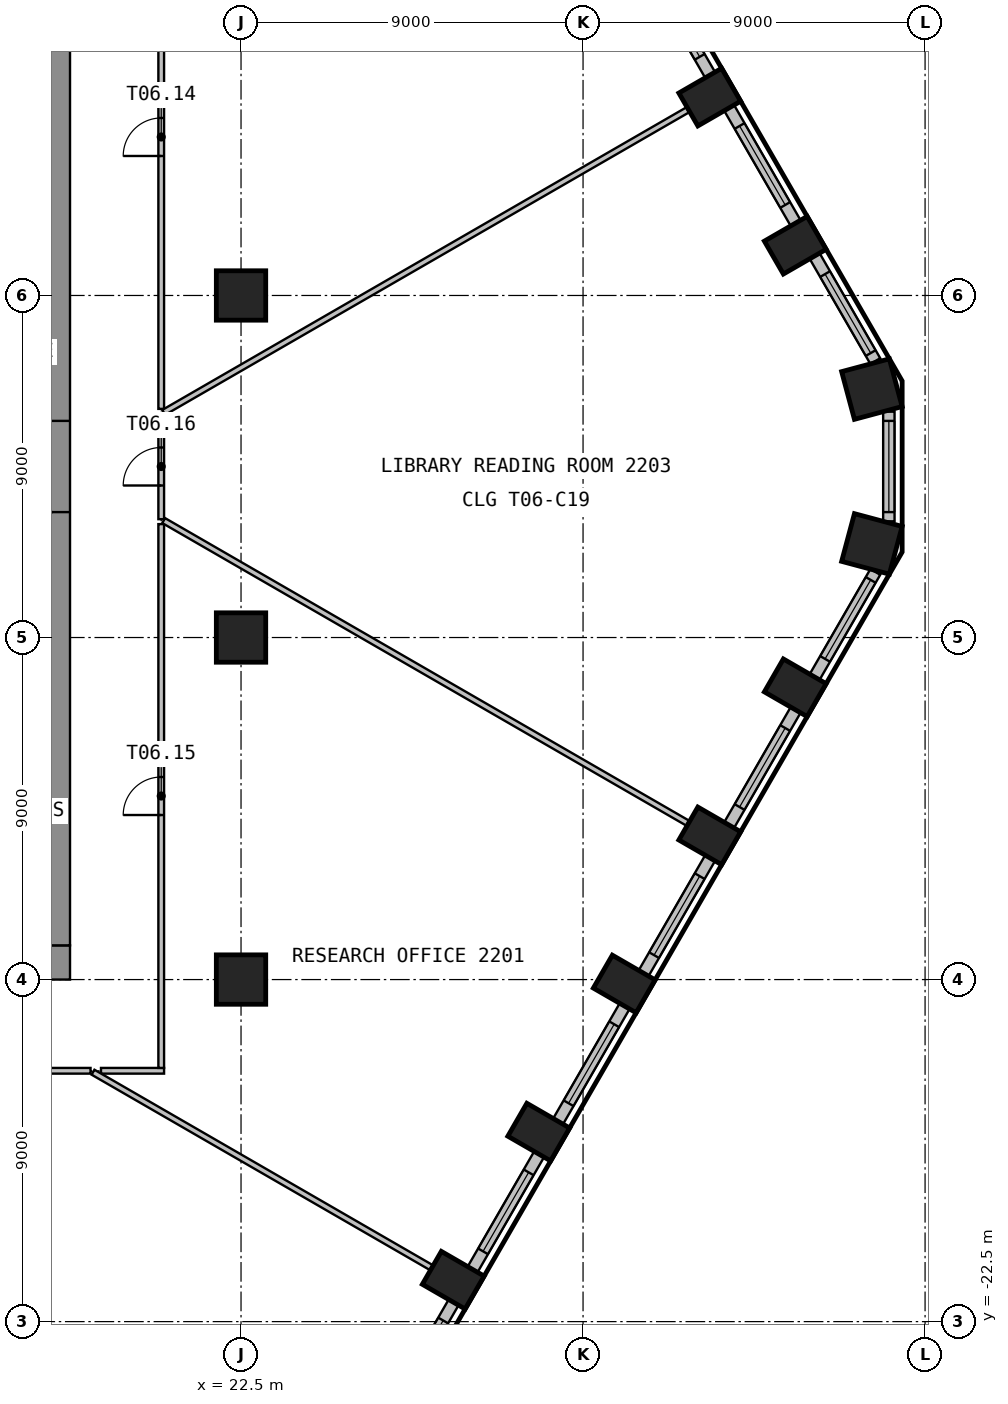
"""IFC4 building model, lengths in metres.
Left out: names, types, materials, properties, quantities, classifications, styles, units other than length and angle.
Written with IfcOpenShell. Run it as: python <this file> out.ifc"""

import sys

from ifc_helpers import new_model, si_unit, direction, frame, frame_2d, origin, origin_2d, place, context, subcontext, project, spatial, rectangle, circle, extrude, element, fill, save


model = new_model("IFC4")
c1 = context("Model", 3, precision=1e-05, world=origin(), true_north=direction((0.0, 1.0)))
c2 = subcontext(c1, "Body", "Model", "MODEL_VIEW")
j1 = project(units=[si_unit("LENGTHUNIT", "METRE"), si_unit("PLANEANGLEUNIT", "RADIAN")], contexts=[c1])
p1 = place(None, origin())
s1 = spatial("IfcSite", under=j1, at=p1, CompositionType="ELEMENT")
p2 = place(p1, origin())
s2 = spatial("IfcBuilding", under=s1, at=p2, CompositionType="ELEMENT")
p3 = place(p2, frame((0.0, 0.0, 93.0)))
s3 = spatial("IfcBuildingStorey", under=s2, at=p3, CompositionType="ELEMENT", Elevation=93.0)
for number, where, z_axis, x_axis in (
    (1, (28.084, -21.411, 0.0), (0.0, 0.0, 1.0), (0.5, 0.866, 0.0)),
    (2, (30.334, -17.513, 0.0), (0.0, 0.0, 1.0), (0.5, 0.866, 0.0)),
    (3, (32.584, -13.616, 0.0), (0.0, 0.0, 1.0), (0.5, 0.866, 0.0)),
    (4, (34.834, -9.719, 0.0), (0.0, 0.0, 1.0), (0.5, 0.866, 0.0)),
    (5, (37.084, -5.822, 0.0), (0.0, 0.0, 1.0), (0.5, 0.866, 0.0)),
):
    element("IfcColumn", number, at=place(p3, frame(where, z_axis=z_axis, x_axis=x_axis)), inside=s3, PredefinedType="COLUMN", context=c2, shape_type="SweptSolid", body=[
        extrude(rectangle(XDim=1.0, YDim=1.3, at=origin_2d()), origin(), (0.0, 0.0, 1.0), 3.525),
    ])
for number, where, z_axis, x_axis in (
    (6, (39.101, -2.037, 0.0), (0.0, 0.0, 1.0), (0.259, 0.966, 0.0)),
    (7, (39.101, 2.037, 0.0), (0.0, 0.0, 1.0), (-0.259, 0.966, 0.0)),
):
    element("IfcColumn", number, at=place(p3, frame(where, z_axis=z_axis, x_axis=x_axis)), inside=s3, PredefinedType="COLUMN", context=c2, shape_type="SweptSolid", body=[
        extrude(rectangle(XDim=1.3, YDim=1.3, at=origin_2d()), origin(), (0.0, 0.0, 1.0), 3.525),
    ])
for number, where, z_axis, x_axis in (
    (8, (37.084, 5.822, 0.0), (0.0, 0.0, 1.0), (-0.5, 0.866, 0.0)),
    (9, (34.834, 9.719, 0.0), (0.0, 0.0, 1.0), (-0.5, 0.866, 0.0)),
):
    element("IfcColumn", number, at=place(p3, frame(where, z_axis=z_axis, x_axis=x_axis)), inside=s3, PredefinedType="COLUMN", context=c2, shape_type="SweptSolid", body=[
        extrude(rectangle(XDim=1.0, YDim=1.3, at=origin_2d()), origin(), (0.0, 0.0, 1.0), 3.525),
    ])
for number, where, z_axis, x_axis in (
    (10, (22.5, -13.5, 0.0), (0.0, 0.0, 1.0), (1.0, 0.0, 0.0)),
    (11, (22.5, -4.5, 0.0), (0.0, 0.0, 1.0), (1.0, 0.0, 0.0)),
    (12, (22.5, 4.5, 0.0), (0.0, 0.0, 1.0), (1.0, 0.0, 0.0)),
):
    element("IfcColumn", number, at=place(p3, frame(where, z_axis=z_axis, x_axis=x_axis)), inside=s3, PredefinedType="COLUMN", context=c2, shape_type="SweptSolid", body=[
        extrude(circle(Radius=0.65, at=origin_2d()), origin(), (0.0, 0.0, 1.0), 3.525),
    ])
p4 = place(p3, frame((26.344, -25.024, 0.0), z_axis=(0.0, 0.0, 1.0), x_axis=(0.499996256241, 0.866027565234, 0.0)))
e13 = element("IfcWall", 13, at=p4, inside=s3, PredefinedType="SOLIDWALL", context=c2, shape_type="SweptSolid", body=[
    extrude(rectangle(XDim=3.499, YDim=0.3, at=frame_2d((1.75, 0.0))), origin(), (0.0, 0.0, 1.0), 3.525),
])
p5 = place(p4, frame((0.55, 0.0, 0.9)))
e14 = element("IfcOpeningElement", 14, at=p5, cuts=e13, PredefinedType="OPENING", context=c2, shape_type="SweptSolid", body=[
    extrude(rectangle(XDim=2.4, YDim=2.1, at=frame_2d((1.2, 1.05))), frame((0.0, 0.16, 0.0), z_axis=(0.0, -1.0, 0.0), x_axis=(1.0, 0.0, 0.0)), (0.0, 0.0, 1.0), 0.32),
])
p6 = place(p3, frame((28.594, -21.127, 0.0), z_axis=(0.0, 0.0, 1.0), x_axis=(0.499996256241, 0.866027565234, 0.0)))
e15 = element("IfcWall", 15, at=p6, inside=s3, PredefinedType="SOLIDWALL", context=c2, shape_type="SweptSolid", body=[
    extrude(rectangle(XDim=3.499, YDim=0.3, at=frame_2d((1.75, 0.0))), origin(), (0.0, 0.0, 1.0), 3.525),
])
p7 = place(p6, frame((0.55, 0.0, 0.9)))
e16 = element("IfcOpeningElement", 16, at=p7, cuts=e15, PredefinedType="OPENING", context=c2, shape_type="SweptSolid", body=[
    extrude(rectangle(XDim=2.4, YDim=2.1, at=frame_2d((1.2, 1.05))), frame((0.0, 0.16, 0.0), z_axis=(0.0, -1.0, 0.0), x_axis=(1.0, 0.0, 0.0)), (0.0, 0.0, 1.0), 0.32),
])
p8 = place(p3, frame((30.844, -17.23, 0.0), z_axis=(0.0, 0.0, 1.0), x_axis=(0.499996256241, 0.866027565234, 0.0)))
e17 = element("IfcWall", 17, at=p8, inside=s3, PredefinedType="SOLIDWALL", context=c2, shape_type="SweptSolid", body=[
    extrude(rectangle(XDim=3.499, YDim=0.3, at=frame_2d((1.75, 0.0))), origin(), (0.0, 0.0, 1.0), 3.525),
])
p9 = place(p8, frame((0.55, 0.0, 0.9)))
e18 = element("IfcOpeningElement", 18, at=p9, cuts=e17, PredefinedType="OPENING", context=c2, shape_type="SweptSolid", body=[
    extrude(rectangle(XDim=2.4, YDim=2.1, at=frame_2d((1.2, 1.05))), frame((0.0, 0.16, 0.0), z_axis=(0.0, -1.0, 0.0), x_axis=(1.0, 0.0, 0.0)), (0.0, 0.0, 1.0), 0.32),
])
p10 = place(p3, frame((33.094, -13.333, 0.0), z_axis=(0.0, 0.0, 1.0), x_axis=(0.499996256241, 0.866027565234, 0.0)))
e19 = element("IfcWall", 19, at=p10, inside=s3, PredefinedType="SOLIDWALL", context=c2, shape_type="SweptSolid", body=[
    extrude(rectangle(XDim=3.499, YDim=0.3, at=frame_2d((1.75, 0.0))), origin(), (0.0, 0.0, 1.0), 3.525),
])
p11 = place(p10, frame((0.55, 0.0, 0.9)))
e20 = element("IfcOpeningElement", 20, at=p11, cuts=e19, PredefinedType="OPENING", context=c2, shape_type="SweptSolid", body=[
    extrude(rectangle(XDim=2.4, YDim=2.1, at=frame_2d((1.2, 1.05))), frame((0.0, 0.16, 0.0), z_axis=(0.0, -1.0, 0.0), x_axis=(1.0, 0.0, 0.0)), (0.0, 0.0, 1.0), 0.32),
])
p12 = place(p3, frame((35.344, -9.436, 0.0), z_axis=(0.0, 0.0, 1.0), x_axis=(0.499996256241, 0.866027565234, 0.0)))
e21 = element("IfcWall", 21, at=p12, inside=s3, PredefinedType="SOLIDWALL", context=c2, shape_type="SweptSolid", body=[
    extrude(rectangle(XDim=3.499, YDim=0.3, at=frame_2d((1.75, 0.0))), origin(), (0.0, 0.0, 1.0), 3.525),
])
p13 = place(p12, frame((0.55, 0.0, 0.9)))
e22 = element("IfcOpeningElement", 22, at=p13, cuts=e21, PredefinedType="OPENING", context=c2, shape_type="SweptSolid", body=[
    extrude(rectangle(XDim=2.4, YDim=2.1, at=frame_2d((1.2, 1.05))), frame((0.0, 0.16, 0.0), z_axis=(0.0, -1.0, 0.0), x_axis=(1.0, 0.0, 0.0)), (0.0, 0.0, 1.0), 0.32),
])
p14 = place(p3, frame((37.594, -5.539, 0.0), z_axis=(0.0, 0.0, 1.0), x_axis=(0.500004907028, 0.866022570692, 0.0)))
e23 = element("IfcWall", 23, at=p14, inside=s3, PredefinedType="SOLIDWALL", context=c2, shape_type="SweptSolid", body=[
    extrude(rectangle(XDim=3.192, YDim=0.3, at=frame_2d((1.596, 0.0))), origin(), (0.0, 0.0, 1.0), 3.525),
])
p15 = place(p14, frame((0.55, 0.0, 0.9)))
e24 = element("IfcOpeningElement", 24, at=p15, cuts=e23, PredefinedType="OPENING", context=c2, shape_type="SweptSolid", body=[
    extrude(rectangle(XDim=2.4, YDim=2.1, at=frame_2d((1.2, 1.05))), frame((0.0, 0.16, 0.0), z_axis=(0.0, -1.0, 0.0), x_axis=(1.0, 0.0, 0.0)), (0.0, 0.0, 1.0), 0.32),
])
p16 = place(p3, frame((39.547, -1.443, 0.0), z_axis=(0.0, 0.0, 1.0), x_axis=(0.0, 1.0, 0.0)))
e25 = element("IfcWall", 25, at=p16, inside=s3, PredefinedType="SOLIDWALL", context=c2, shape_type="SweptSolid", body=[
    extrude(rectangle(XDim=2.886, YDim=0.3, at=frame_2d((1.443, 0.0))), origin(), (0.0, 0.0, 1.0), 3.525),
])
p17 = place(p16, frame((0.243, 0.0, 0.9)))
e26 = element("IfcOpeningElement", 26, at=p17, cuts=e25, PredefinedType="OPENING", context=c2, shape_type="SweptSolid", body=[
    extrude(rectangle(XDim=2.4, YDim=2.1, at=frame_2d((1.2, 1.05))), frame((0.0, 0.16, 0.0), z_axis=(0.0, -1.0, 0.0), x_axis=(1.0, 0.0, 0.0)), (0.0, 0.0, 1.0), 0.32),
])
p18 = place(p3, frame((39.19, 2.774, 0.0), z_axis=(0.0, 0.0, 1.0), x_axis=(-0.500004907028, 0.866022570692, 0.0)))
e27 = element("IfcWall", 27, at=p18, inside=s3, PredefinedType="SOLIDWALL", context=c2, shape_type="SweptSolid", body=[
    extrude(rectangle(XDim=3.192, YDim=0.3, at=frame_2d((1.596, 0.0))), origin(), (0.0, 0.0, 1.0), 3.525),
])
p19 = place(p18, frame((0.243, 0.0, 0.9)))
e28 = element("IfcOpeningElement", 28, at=p19, cuts=e27, PredefinedType="OPENING", context=c2, shape_type="SweptSolid", body=[
    extrude(rectangle(XDim=2.4, YDim=2.1, at=frame_2d((1.2, 1.05))), frame((0.0, 0.16, 0.0), z_axis=(0.0, -1.0, 0.0), x_axis=(1.0, 0.0, 0.0)), (0.0, 0.0, 1.0), 0.32),
])
p20 = place(p3, frame((37.094, 6.406, 0.0), z_axis=(0.0, 0.0, 1.0), x_axis=(-0.499996256241, 0.866027565234, 0.0)))
e29 = element("IfcWall", 29, at=p20, inside=s3, PredefinedType="SOLIDWALL", context=c2, shape_type="SweptSolid", body=[
    extrude(rectangle(XDim=3.499, YDim=0.3, at=frame_2d((1.75, 0.0))), origin(), (0.0, 0.0, 1.0), 3.525),
])
p21 = place(p20, frame((0.55, 0.0, 0.9)))
e30 = element("IfcOpeningElement", 30, at=p21, cuts=e29, PredefinedType="OPENING", context=c2, shape_type="SweptSolid", body=[
    extrude(rectangle(XDim=2.4, YDim=2.1, at=frame_2d((1.2, 1.05))), frame((0.0, 0.16, 0.0), z_axis=(0.0, -1.0, 0.0), x_axis=(1.0, 0.0, 0.0)), (0.0, 0.0, 1.0), 0.32),
])
p22 = place(p3, frame((34.844, 10.303, 0.0), z_axis=(0.0, 0.0, 1.0), x_axis=(-0.499996256241, 0.866027565234, 0.0)))
e31 = element("IfcWall", 31, at=p22, inside=s3, PredefinedType="SOLIDWALL", context=c2, shape_type="SweptSolid", body=[
    extrude(rectangle(XDim=3.499, YDim=0.3, at=frame_2d((1.75, 0.0))), origin(), (0.0, 0.0, 1.0), 3.525),
])
p23 = place(p22, frame((0.55, 0.0, 0.9)))
e32 = element("IfcOpeningElement", 32, at=p23, cuts=e31, PredefinedType="OPENING", context=c2, shape_type="SweptSolid", body=[
    extrude(rectangle(XDim=2.4, YDim=2.1, at=frame_2d((1.2, 1.05))), frame((0.0, 0.16, 0.0), z_axis=(0.0, -1.0, 0.0), x_axis=(1.0, 0.0, 0.0)), (0.0, 0.0, 1.0), 0.32),
])
p24 = place(p3, frame((-18.0, -13.05, 0.0), z_axis=(0.0, 0.0, 1.0), x_axis=(1.0, 0.0, 0.0)))
e33 = element("IfcWall", 33, at=p24, inside=s3, PredefinedType="SHEAR", context=c2, shape_type="SweptSolid", body=[
    extrude(rectangle(XDim=36.0, YDim=0.9, at=frame_2d((18.0, 0.0))), origin(), (0.0, 0.0, 1.0), 3.525),
])
p25 = place(p24, frame((16.8, 0.0, 0.0)))
e34 = element("IfcOpeningElement", 34, at=p25, cuts=e33, PredefinedType="OPENING", context=c2, shape_type="SweptSolid", body=[
    extrude(rectangle(XDim=2.4, YDim=2.1, at=frame_2d((1.2, 1.05))), frame((0.0, 0.46, 0.0), z_axis=(0.0, -1.0, 0.0), x_axis=(1.0, 0.0, 0.0)), (0.0, 0.0, 1.0), 0.92),
])
p26 = place(p24, frame((5.55, 0.0, 0.0)))
e35 = element("IfcOpeningElement", 35, at=p26, cuts=e33, PredefinedType="OPENING", context=c2, shape_type="SweptSolid", body=[
    extrude(rectangle(XDim=1.2, YDim=2.1, at=frame_2d((0.6, 1.05))), frame((0.0, 0.46, 0.0), z_axis=(0.0, -1.0, 0.0), x_axis=(1.0, 0.0, 0.0)), (0.0, 0.0, 1.0), 0.92),
])
p27 = place(p24, frame((29.25, 0.0, 0.0)))
e36 = element("IfcOpeningElement", 36, at=p27, cuts=e33, PredefinedType="OPENING", context=c2, shape_type="SweptSolid", body=[
    extrude(rectangle(XDim=1.2, YDim=2.1, at=frame_2d((0.6, 1.05))), frame((0.0, 0.46, 0.0), z_axis=(0.0, -1.0, 0.0), x_axis=(1.0, 0.0, 0.0)), (0.0, 0.0, 1.0), 0.92),
])
p28 = place(p3, frame((17.55, -12.6, 0.0), z_axis=(0.0, 0.0, 1.0), x_axis=(0.0, 1.0, 0.0)))
e37 = element("IfcWall", 37, at=p28, inside=s3, PredefinedType="SHEAR", context=c2, shape_type="SweptSolid", body=[
    extrude(rectangle(XDim=25.2, YDim=0.9, at=frame_2d((12.6, 0.0))), origin(), (0.0, 0.0, 1.0), 3.525),
])
p29 = place(p28, frame((11.4, 0.0, 0.0)))
e38 = element("IfcOpeningElement", 38, at=p29, cuts=e37, PredefinedType="OPENING", context=c2, shape_type="SweptSolid", body=[
    extrude(rectangle(XDim=2.4, YDim=2.1, at=frame_2d((1.2, 1.05))), frame((0.0, 0.46, 0.0), z_axis=(0.0, -1.0, 0.0), x_axis=(1.0, 0.0, 0.0)), (0.0, 0.0, 1.0), 0.92),
])
p30 = place(p3, frame((11.25, -15.9, 0.0), z_axis=(0.0, 0.0, 1.0), x_axis=(1.0, 0.0, 0.0)))
e39 = element("IfcWall", 39, at=p30, inside=s3, PredefinedType="PARTITIONING", context=c2, shape_type="SweptSolid", body=[
    extrude(rectangle(XDim=7.29, YDim=0.15, at=frame_2d((3.645, 0.0))), origin(), (0.0, 0.0, 1.0), 3.525),
])
p31 = place(p3, frame((18.815, -15.9, 0.0), z_axis=(0.0, 0.0, 1.0), x_axis=(1.0, 0.0, 0.0)))
e40 = element("IfcWall", 40, at=p31, inside=s3, PredefinedType="PARTITIONING", context=c2, shape_type="SweptSolid", body=[
    extrude(rectangle(XDim=1.66, YDim=0.15, at=frame_2d((0.83, 0.0))), origin(), (0.0, 0.0, 1.0), 3.525),
])
p32 = place(p3, frame((18.605, -15.938, 0.0), z_axis=(0.0, 0.0, 1.0), x_axis=(0.8659928916, -0.500056308527, 0.0)))
e41 = element("IfcWall", 41, at=p32, inside=s3, PredefinedType="PARTITIONING", context=c2, shape_type="SweptSolid", body=[
    extrude(rectangle(XDim=10.276, YDim=0.15, at=frame_2d((5.138, 0.0))), origin(), (0.0, 0.0, 1.0), 3.525),
])
p33 = place(p3, frame((20.4, -15.825, 0.0), z_axis=(0.0, 0.0, 1.0), x_axis=(0.0, 1.0, 0.0)))
e42 = element("IfcWall", 42, at=p33, inside=s3, PredefinedType="PARTITIONING", context=c2, shape_type="SweptSolid", body=[
    extrude(rectangle(XDim=14.309, YDim=0.15, at=frame_2d((7.154, 0.0))), origin(), (0.0, 0.0, 1.0), 3.525),
])
p34 = place(p33, frame((6.655, 0.0, 0.0)))
e43 = element("IfcOpeningElement", 43, at=p34, cuts=e42, PredefinedType="OPENING", context=c2, shape_type="SweptSolid", body=[
    extrude(rectangle(XDim=1.0, YDim=2.1, at=frame_2d((0.5, 1.05))), frame((0.0, 0.085, 0.0), z_axis=(0.0, -1.0, 0.0), x_axis=(1.0, 0.0, 0.0)), (0.0, 0.0, 1.0), 0.17),
])
p35 = place(p3, frame((20.4, -1.386, 0.0), z_axis=(0.0, 0.0, 1.0), x_axis=(0.0, 1.0, 0.0)))
e44 = element("IfcWall", 44, at=p35, inside=s3, PredefinedType="PARTITIONING", context=c2, shape_type="SweptSolid", body=[
    extrude(rectangle(XDim=2.772, YDim=0.15, at=frame_2d((1.386, 0.0))), origin(), (0.0, 0.0, 1.0), 3.525),
])
p36 = place(p35, frame((0.886, 0.0, 0.0)))
e45 = element("IfcOpeningElement", 45, at=p36, cuts=e44, PredefinedType="OPENING", context=c2, shape_type="SweptSolid", body=[
    extrude(rectangle(XDim=1.0, YDim=2.1, at=frame_2d((0.5, 1.05))), frame((0.0, 0.085, 0.0), z_axis=(0.0, -1.0, 0.0), x_axis=(1.0, 0.0, 0.0)), (0.0, 0.0, 1.0), 0.17),
])
p37 = place(p3, frame((20.465, -1.424, 0.0), z_axis=(0.0, 0.0, 1.0), x_axis=(0.866033144593, -0.499986592286, 0.0)))
e46 = element("IfcWall", 46, at=p37, inside=s3, PredefinedType="PARTITIONING", context=c2, shape_type="SweptSolid", body=[
    extrude(rectangle(XDim=15.922, YDim=0.15, at=frame_2d((7.961, 0.0))), origin(), (0.0, 0.0, 1.0), 3.525),
])
p38 = place(p3, frame((20.4, 1.516, 0.0), z_axis=(0.0, 0.0, 1.0), x_axis=(0.0, 1.0, 0.0)))
e47 = element("IfcWall", 47, at=p38, inside=s3, PredefinedType="PARTITIONING", context=c2, shape_type="SweptSolid", body=[
    extrude(rectangle(XDim=14.309, YDim=0.15, at=frame_2d((7.154, 0.0))), origin(), (0.0, 0.0, 1.0), 3.525),
])
p39 = place(p38, frame((6.655, 0.0, 0.0)))
e48 = element("IfcOpeningElement", 48, at=p39, cuts=e47, PredefinedType="OPENING", context=c2, shape_type="SweptSolid", body=[
    extrude(rectangle(XDim=1.0, YDim=2.1, at=frame_2d((0.5, 1.05))), frame((0.0, 0.085, 0.0), z_axis=(0.0, -1.0, 0.0), x_axis=(1.0, 0.0, 0.0)), (0.0, 0.0, 1.0), 0.17),
])
p40 = place(p3, frame((34.254, 9.384, 0.0), z_axis=(0.0, 0.0, 1.0), x_axis=(-0.866033144593, -0.499986592286, 0.0)))
e49 = element("IfcWall", 49, at=p40, inside=s3, PredefinedType="PARTITIONING", context=c2, shape_type="SweptSolid", body=[
    extrude(rectangle(XDim=15.922, YDim=0.15, at=frame_2d((7.961, 0.0))), origin(), (0.0, 0.0, 1.0), 3.525),
])
p41 = place(p5, origin())
e50 = element("IfcWindow", 50, at=p41, inside=s3, PartitioningType="SINGLE_PANEL", PredefinedType="WINDOW", context=c2, shape_type="SweptSolid", body=[
    extrude(rectangle(XDim=2.4, YDim=2.1, at=frame_2d((1.2, 1.05))), frame((0.0, 0.03, 0.0), z_axis=(0.0, -1.0, 0.0), x_axis=(1.0, 0.0, 0.0)), (0.0, 0.0, 1.0), 0.06),
])
fill(e14, e50)
p42 = place(p7, origin())
e51 = element("IfcWindow", 51, at=p42, inside=s3, PartitioningType="SINGLE_PANEL", PredefinedType="WINDOW", context=c2, shape_type="SweptSolid", body=[
    extrude(rectangle(XDim=2.4, YDim=2.1, at=frame_2d((1.2, 1.05))), frame((0.0, 0.03, 0.0), z_axis=(0.0, -1.0, 0.0), x_axis=(1.0, 0.0, 0.0)), (0.0, 0.0, 1.0), 0.06),
])
fill(e16, e51)
p43 = place(p9, origin())
e52 = element("IfcWindow", 52, at=p43, inside=s3, PartitioningType="SINGLE_PANEL", PredefinedType="WINDOW", context=c2, shape_type="SweptSolid", body=[
    extrude(rectangle(XDim=2.4, YDim=2.1, at=frame_2d((1.2, 1.05))), frame((0.0, 0.03, 0.0), z_axis=(0.0, -1.0, 0.0), x_axis=(1.0, 0.0, 0.0)), (0.0, 0.0, 1.0), 0.06),
])
fill(e18, e52)
p44 = place(p11, origin())
e53 = element("IfcWindow", 53, at=p44, inside=s3, PartitioningType="SINGLE_PANEL", PredefinedType="WINDOW", context=c2, shape_type="SweptSolid", body=[
    extrude(rectangle(XDim=2.4, YDim=2.1, at=frame_2d((1.2, 1.05))), frame((0.0, 0.03, 0.0), z_axis=(0.0, -1.0, 0.0), x_axis=(1.0, 0.0, 0.0)), (0.0, 0.0, 1.0), 0.06),
])
fill(e20, e53)
p45 = place(p13, origin())
e54 = element("IfcWindow", 54, at=p45, inside=s3, PartitioningType="SINGLE_PANEL", PredefinedType="WINDOW", context=c2, shape_type="SweptSolid", body=[
    extrude(rectangle(XDim=2.4, YDim=2.1, at=frame_2d((1.2, 1.05))), frame((0.0, 0.03, 0.0), z_axis=(0.0, -1.0, 0.0), x_axis=(1.0, 0.0, 0.0)), (0.0, 0.0, 1.0), 0.06),
])
fill(e22, e54)
p46 = place(p15, origin())
e55 = element("IfcWindow", 55, at=p46, inside=s3, PartitioningType="SINGLE_PANEL", PredefinedType="WINDOW", context=c2, shape_type="SweptSolid", body=[
    extrude(rectangle(XDim=2.4, YDim=2.1, at=frame_2d((1.2, 1.05))), frame((0.0, 0.03, 0.0), z_axis=(0.0, -1.0, 0.0), x_axis=(1.0, 0.0, 0.0)), (0.0, 0.0, 1.0), 0.06),
])
fill(e24, e55)
p47 = place(p17, origin())
e56 = element("IfcWindow", 56, at=p47, inside=s3, PartitioningType="SINGLE_PANEL", PredefinedType="WINDOW", context=c2, shape_type="SweptSolid", body=[
    extrude(rectangle(XDim=2.4, YDim=2.1, at=frame_2d((1.2, 1.05))), frame((0.0, 0.03, 0.0), z_axis=(0.0, -1.0, 0.0), x_axis=(1.0, 0.0, 0.0)), (0.0, 0.0, 1.0), 0.06),
])
fill(e26, e56)
p48 = place(p19, origin())
e57 = element("IfcWindow", 57, at=p48, inside=s3, PartitioningType="SINGLE_PANEL", PredefinedType="WINDOW", context=c2, shape_type="SweptSolid", body=[
    extrude(rectangle(XDim=2.4, YDim=2.1, at=frame_2d((1.2, 1.05))), frame((0.0, 0.03, 0.0), z_axis=(0.0, -1.0, 0.0), x_axis=(1.0, 0.0, 0.0)), (0.0, 0.0, 1.0), 0.06),
])
fill(e28, e57)
p49 = place(p21, origin())
e58 = element("IfcWindow", 58, at=p49, inside=s3, PartitioningType="SINGLE_PANEL", PredefinedType="WINDOW", context=c2, shape_type="SweptSolid", body=[
    extrude(rectangle(XDim=2.4, YDim=2.1, at=frame_2d((1.2, 1.05))), frame((0.0, 0.03, 0.0), z_axis=(0.0, -1.0, 0.0), x_axis=(1.0, 0.0, 0.0)), (0.0, 0.0, 1.0), 0.06),
])
fill(e30, e58)
p50 = place(p23, origin())
e59 = element("IfcWindow", 59, at=p50, inside=s3, PartitioningType="SINGLE_PANEL", PredefinedType="WINDOW", context=c2, shape_type="SweptSolid", body=[
    extrude(rectangle(XDim=2.4, YDim=2.1, at=frame_2d((1.2, 1.05))), frame((0.0, 0.03, 0.0), z_axis=(0.0, -1.0, 0.0), x_axis=(1.0, 0.0, 0.0)), (0.0, 0.0, 1.0), 0.06),
])
fill(e32, e59)
p51 = place(p29, origin())
e60 = element("IfcDoor", 60, at=p51, inside=s3, OperationType="DOUBLE_DOOR_DOUBLE_SWING", PredefinedType="DOOR", context=c2, shape_type="SweptSolid", body=[
    extrude(rectangle(XDim=2.4, YDim=2.1, at=frame_2d((1.2, 1.05))), frame((0.0, 0.025, 0.0), z_axis=(0.0, -1.0, 0.0), x_axis=(1.0, 0.0, 0.0)), (0.0, 0.0, 1.0), 0.05),
])
fill(e38, e60)
p52 = place(p39, origin())
e61 = element("IfcDoor", 61, at=p52, inside=s3, OperationType="SINGLE_SWING_RIGHT", PredefinedType="DOOR", context=c2, shape_type="SweptSolid", body=[
    extrude(rectangle(XDim=1.0, YDim=2.1, at=frame_2d((0.5, 1.05))), frame((0.0, 0.025, 0.0), z_axis=(0.0, -1.0, 0.0), x_axis=(1.0, 0.0, 0.0)), (0.0, 0.0, 1.0), 0.05),
])
fill(e48, e61)
p53 = place(p34, origin())
e62 = element("IfcDoor", 62, at=p53, inside=s3, OperationType="SINGLE_SWING_LEFT", PredefinedType="DOOR", context=c2, shape_type="SweptSolid", body=[
    extrude(rectangle(XDim=1.0, YDim=2.1, at=frame_2d((0.5, 1.05))), frame((0.0, 0.025, 0.0), z_axis=(0.0, -1.0, 0.0), x_axis=(1.0, 0.0, 0.0)), (0.0, 0.0, 1.0), 0.05),
])
fill(e43, e62)
p54 = place(p36, origin())
e63 = element("IfcDoor", 63, at=p54, inside=s3, OperationType="SINGLE_SWING_RIGHT", PredefinedType="DOOR", context=c2, shape_type="SweptSolid", body=[
    extrude(rectangle(XDim=1.0, YDim=2.1, at=frame_2d((0.5, 1.05))), frame((0.0, 0.025, 0.0), z_axis=(0.0, -1.0, 0.0), x_axis=(1.0, 0.0, 0.0)), (0.0, 0.0, 1.0), 0.05),
])
fill(e45, e63)
save(model, sys.argv[1])
